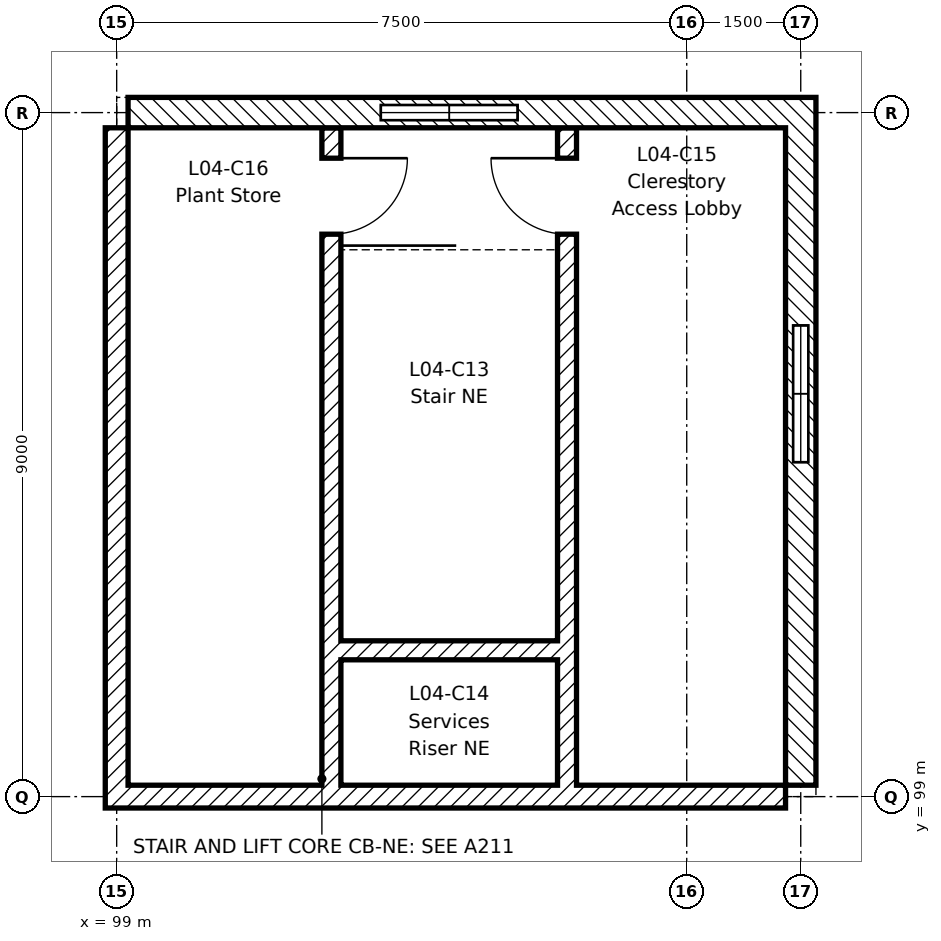
"""IFC4 building model, lengths in metres.
Left out: names, types, materials, properties, quantities, classifications, styles, units other than length and angle.
Written with IfcOpenShell. Run it as: python <this file> out.ifc"""

import sys

from ifc_helpers import new_model, si_unit, direction, frame, frame_2d, origin, place, context, subcontext, project, spatial, rectangle, extrude, element, fill, save


model = new_model("IFC4")
c1 = context("Model", 3, precision=1e-05, world=origin(), true_north=direction((0.0, 1.0)))
c2 = subcontext(c1, "Body", "Model", "MODEL_VIEW")
j1 = project(units=[si_unit("LENGTHUNIT", "METRE"), si_unit("PLANEANGLEUNIT", "RADIAN")], contexts=[c1])
p1 = place(None, origin())
s1 = spatial("IfcSite", under=j1, at=p1, CompositionType="ELEMENT")
p2 = place(p1, origin())
s2 = spatial("IfcBuilding", under=s1, at=p2, CompositionType="ELEMENT")
p3 = place(p2, frame((0.0, 0.0, 18.6)))
s3 = spatial("IfcBuildingStorey", under=s2, at=p3, CompositionType="ELEMENT", Elevation=18.6)
p4 = place(p3, frame((107.8, 99.0, 0.0), z_axis=(0.0, 0.0, 1.0), x_axis=(-1.0, 0.0, 0.0)))
e1 = element("IfcWall", 1, at=p4, inside=s3, PredefinedType="SHEAR", context=c2, shape_type="SweptSolid", body=[
    extrude(rectangle(XDim=8.95, YDim=0.3, at=frame_2d((4.475, 0.0))), origin(), (0.0, 0.0, 1.0), 3.95),
])
p5 = place(p3, frame((99.0, 107.8, 0.0), z_axis=(0.0, 0.0, 1.0), x_axis=(0.0, -1.0, 0.0)))
e2 = element("IfcWall", 2, at=p5, inside=s3, PredefinedType="SHEAR", context=c2, shape_type="SweptSolid", body=[
    extrude(rectangle(XDim=8.65, YDim=0.3, at=frame_2d((4.325, 0.0))), origin(), (0.0, 0.0, 1.0), 3.95),
])
p6 = place(p3, frame((104.925, 107.8, 0.0), z_axis=(0.0, 0.0, 1.0), x_axis=(0.0, -1.0, 0.0)))
e3 = element("IfcWall", 3, at=p6, inside=s3, PredefinedType="SHEAR", context=c2, shape_type="SweptSolid", body=[
    extrude(rectangle(XDim=8.65, YDim=0.25, at=frame_2d((4.325, 0.0))), origin(), (0.0, 0.0, 1.0), 3.95),
])
p7 = place(p6, frame((0.4, 0.0, 0.0)))
e4 = element("IfcOpeningElement", 4, at=p7, cuts=e3, PredefinedType="OPENING", context=c2, shape_type="SweptSolid", body=[
    extrude(rectangle(XDim=1.0, YDim=2.1, at=frame_2d((0.5, 1.05))), frame((0.0, 0.135, 0.0), z_axis=(0.0, -1.0, 0.0), x_axis=(1.0, 0.0, 0.0)), (0.0, 0.0, 1.0), 0.27),
])
p8 = place(p3, frame((101.825, 107.8, 0.0), z_axis=(0.0, 0.0, 1.0), x_axis=(0.0, -1.0, 0.0)))
e5 = element("IfcWall", 5, at=p8, inside=s3, PredefinedType="SHEAR", context=c2, shape_type="SweptSolid", body=[
    extrude(rectangle(XDim=8.65, YDim=0.25, at=frame_2d((4.325, 0.0))), origin(), (0.0, 0.0, 1.0), 3.95),
])
p9 = place(p8, frame((0.4, 0.0, 0.0)))
e6 = element("IfcOpeningElement", 6, at=p9, cuts=e5, PredefinedType="OPENING", context=c2, shape_type="SweptSolid", body=[
    extrude(rectangle(XDim=1.0, YDim=2.1, at=frame_2d((0.5, 1.05))), frame((0.0, 0.135, 0.0), z_axis=(0.0, -1.0, 0.0), x_axis=(1.0, 0.0, 0.0)), (0.0, 0.0, 1.0), 0.27),
])
p10 = place(p3, frame((104.8, 100.925, 0.0), z_axis=(0.0, 0.0, 1.0), x_axis=(-1.0, 0.0, 0.0)))
e7 = element("IfcWall", 7, at=p10, inside=s3, PredefinedType="SHEAR", context=c2, shape_type="SweptSolid", body=[
    extrude(rectangle(XDim=2.85, YDim=0.25, at=frame_2d((1.425, 0.0))), origin(), (0.0, 0.0, 1.0), 3.95),
])
p11 = place(p3, frame((99.15, 108.0, 0.0), z_axis=(0.0, 0.0, 1.0), x_axis=(1.0, 0.0, 0.0)))
e8 = element("IfcWall", 8, at=p11, inside=s3, PredefinedType="STANDARD", context=c2, shape_type="SweptSolid", body=[
    extrude(rectangle(XDim=3.325, YDim=0.4, at=frame_2d((1.663, 0.0))), origin(), (0.0, 0.0, 1.0), 3.95),
])
p12 = place(p3, frame((104.275, 108.0, 0.0), z_axis=(0.0, 0.0, 1.0), x_axis=(1.0, 0.0, 0.0)))
e9 = element("IfcWall", 9, at=p12, inside=s3, PredefinedType="STANDARD", context=c2, shape_type="SweptSolid", body=[
    extrude(rectangle(XDim=3.925, YDim=0.4, at=frame_2d((1.962, 0.0))), origin(), (0.0, 0.0, 1.0), 3.95),
])
p13 = place(p3, frame((102.475, 108.0, 0.0), z_axis=(0.0, 0.0, 1.0), x_axis=(1.0, 0.0, 0.0)))
e10 = element("IfcWall", 10, at=p13, inside=s3, PredefinedType="STANDARD", context=c2, shape_type="SweptSolid", body=[
    extrude(rectangle(XDim=1.8, YDim=0.4, at=frame_2d((0.9, 0.0))), origin(), (0.0, 0.0, 1.0), 0.9),
])
p14 = place(p3, frame((108.0, 99.15, 0.0), z_axis=(0.0, 0.0, 1.0), x_axis=(0.0, 1.0, 0.0)))
e11 = element("IfcWall", 11, at=p14, inside=s3, PredefinedType="STANDARD", context=c2, shape_type="SweptSolid", body=[
    extrude(rectangle(XDim=4.25, YDim=0.4, at=frame_2d((2.125, 0.0))), origin(), (0.0, 0.0, 1.0), 3.95),
])
p15 = place(p3, frame((108.0, 105.2, 0.0), z_axis=(0.0, 0.0, 1.0), x_axis=(0.0, 1.0, 0.0)))
e12 = element("IfcWall", 12, at=p15, inside=s3, PredefinedType="STANDARD", context=c2, shape_type="SweptSolid", body=[
    extrude(rectangle(XDim=2.6, YDim=0.4, at=frame_2d((1.3, 0.0))), origin(), (0.0, 0.0, 1.0), 3.95),
])
p16 = place(p3, frame((108.0, 103.4, 0.0), z_axis=(0.0, 0.0, 1.0), x_axis=(0.0, 1.0, 0.0)))
e13 = element("IfcWall", 13, at=p16, inside=s3, PredefinedType="STANDARD", context=c2, shape_type="SweptSolid", body=[
    extrude(rectangle(XDim=1.8, YDim=0.4, at=frame_2d((0.9, 0.0))), origin(), (0.0, 0.0, 1.0), 0.9),
])
p17 = place(p7, frame((1.0, 0.0, 0.0), z_axis=(0.0, 0.0, 1.0), x_axis=(-1.0, 0.0, 0.0)))
e14 = element("IfcDoor", 14, at=p17, inside=s3, OperationType="SINGLE_SWING_RIGHT", PredefinedType="DOOR", context=c2, shape_type="SweptSolid", body=[
    extrude(rectangle(XDim=1.0, YDim=2.1, at=frame_2d((0.5, 1.05))), frame((0.0, 0.025, 0.0), z_axis=(0.0, -1.0, 0.0), x_axis=(1.0, 0.0, 0.0)), (0.0, 0.0, 1.0), 0.05),
])
fill(e4, e14)
p18 = place(p9, origin())
e15 = element("IfcDoor", 15, at=p18, inside=s3, OperationType="SINGLE_SWING_LEFT", PredefinedType="DOOR", context=c2, shape_type="SweptSolid", body=[
    extrude(rectangle(XDim=1.0, YDim=2.1, at=frame_2d((0.5, 1.05))), frame((0.0, 0.025, 0.0), z_axis=(0.0, -1.0, 0.0), x_axis=(1.0, 0.0, 0.0)), (0.0, 0.0, 1.0), 0.05),
])
fill(e6, e15)
save(model, sys.argv[1])
